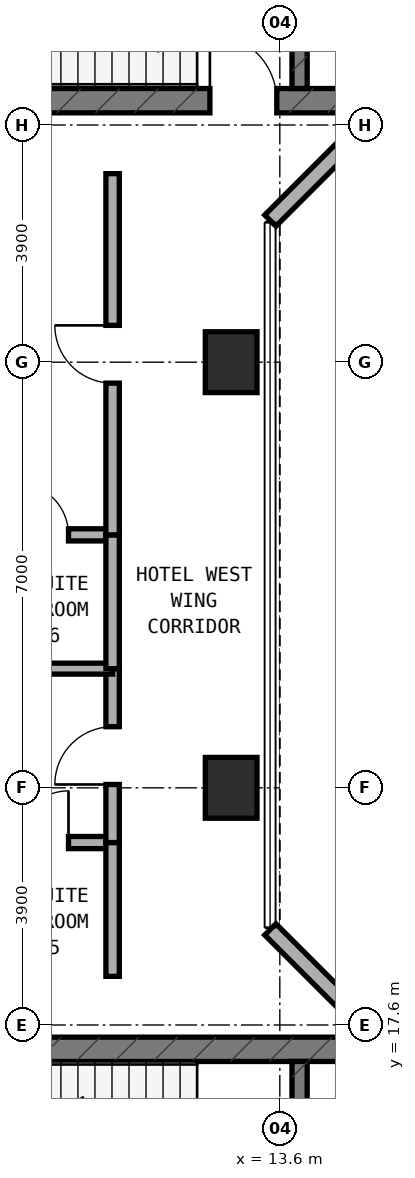
"""IFC4 building model, lengths in metres.
Left out: names, types, materials, properties, quantities, classifications, styles, units other than length and angle.
Written with IfcOpenShell. Run it as: python <this file> out.ifc"""

import sys

from ifc_helpers import new_model, si_unit, direction, frame, frame_2d, origin, origin_2d, place, context, subcontext, project, spatial, rectangle, extrude, element, fill, save


model = new_model("IFC4")
c1 = context("Model", 3, precision=1e-05, world=origin(), true_north=direction((0.0, 1.0)))
c2 = subcontext(c1, "Body", "Model", "MODEL_VIEW")
j1 = project(units=[si_unit("LENGTHUNIT", "METRE"), si_unit("PLANEANGLEUNIT", "RADIAN")], contexts=[c1])
p1 = place(None, origin())
s1 = spatial("IfcSite", under=j1, at=p1, CompositionType="ELEMENT")
p2 = place(p1, origin())
s2 = spatial("IfcBuilding", under=s1, at=p2, CompositionType="ELEMENT")
p3 = place(p2, frame((0.0, 0.0, 109.0)))
s3 = spatial("IfcBuildingStorey", under=s2, at=p3, CompositionType="ELEMENT", Elevation=109.0)
p4 = place(p3, frame((6.4, 32.8, 0.0), z_axis=(0.0, 0.0, 1.0), x_axis=(1.0, 0.0, 0.0)))
e1 = element("IfcWall", 1, at=p4, inside=s3, PredefinedType="SHEAR", context=c2, shape_type="SweptSolid", body=[
    extrude(rectangle(XDim=24.4, YDim=0.4, at=frame_2d((12.2, 0.0))), origin(), (0.0, 0.0, 1.0), 3.5),
])
p5 = place(p4, frame((6.05, 0.0, 0.0)))
e2 = element("IfcOpeningElement", 2, at=p5, cuts=e1, PredefinedType="OPENING", context=c2, shape_type="SweptSolid", body=[
    extrude(rectangle(XDim=1.1, YDim=2.15, at=frame_2d((0.55, 1.075))), frame((0.0, 0.21, 0.0), z_axis=(0.0, -1.0, 0.0), x_axis=(1.0, 0.0, 0.0)), (0.0, 0.0, 1.0), 0.42),
])
p6 = place(p3, frame((13.925, 33.0, 0.0), z_axis=(0.0, 0.0, 1.0), x_axis=(0.0, 1.0, 0.0)))
e3 = element("IfcWall", 3, at=p6, inside=s3, PredefinedType="STANDARD", context=c2, shape_type="SweptSolid", body=[
    extrude(rectangle(XDim=3.16, YDim=0.25, at=frame_2d((1.58, 0.0))), origin(), (0.0, 0.0, 1.0), 3.22),
])
p7 = place(p6, frame((0.98, 0.0, 0.0)))
e4 = element("IfcOpeningElement", 4, at=p7, cuts=e3, PredefinedType="OPENING", context=c2, shape_type="SweptSolid", body=[
    extrude(rectangle(XDim=1.1, YDim=2.15, at=frame_2d((0.55, 1.075))), frame((0.0, 0.135, 0.0), z_axis=(0.0, -1.0, 0.0), x_axis=(1.0, 0.0, 0.0)), (0.0, 0.0, 1.0), 0.27),
])
p8 = place(p3, frame((6.4, 17.2, 0.0), z_axis=(0.0, 0.0, 1.0), x_axis=(1.0, 0.0, 0.0)))
e5 = element("IfcWall", 5, at=p8, inside=s3, PredefinedType="SHEAR", context=c2, shape_type="SweptSolid", body=[
    extrude(rectangle(XDim=24.4, YDim=0.4, at=frame_2d((12.2, 0.0))), origin(), (0.0, 0.0, 1.0), 3.5),
])
p9 = place(p3, frame((13.925, 13.84, 0.0), z_axis=(0.0, 0.0, 1.0), x_axis=(0.0, 1.0, 0.0)))
e6 = element("IfcWall", 6, at=p9, inside=s3, PredefinedType="STANDARD", context=c2, shape_type="SweptSolid", body=[
    extrude(rectangle(XDim=3.16, YDim=0.25, at=frame_2d((1.58, 0.0))), origin(), (0.0, 0.0, 1.0), 3.22),
])
p10 = place(p9, frame((0.98, 0.0, 0.0)))
e7 = element("IfcOpeningElement", 7, at=p10, cuts=e6, PredefinedType="OPENING", context=c2, shape_type="SweptSolid", body=[
    extrude(rectangle(XDim=1.1, YDim=2.15, at=frame_2d((0.55, 1.075))), frame((0.0, 0.135, 0.0), z_axis=(0.0, -1.0, 0.0), x_axis=(1.0, 0.0, 0.0)), (0.0, 0.0, 1.0), 0.27),
])
for number, where, z_axis, x_axis in (
    (8, (12.8, 21.5, 0.0), (0.0, 0.0, 1.0), (1.0, 0.0, 0.0)),
    (9, (12.8, 28.5, 0.0), (0.0, 0.0, 1.0), (1.0, 0.0, 0.0)),
):
    element("IfcColumn", number, at=place(p3, frame(where, z_axis=z_axis, x_axis=x_axis)), inside=s3, PredefinedType="COLUMN", context=c2, shape_type="SweptSolid", body=[
        extrude(rectangle(XDim=0.85, YDim=1.0, at=origin_2d()), origin(), (0.0, 0.0, 1.0), 3.5),
    ])
for number, where, z_axis, x_axis in (
    (10, (15.278, 32.662, 0.0), (0.0, 0.0, 1.0), (-0.707, -0.707, 0.0)),
    (11, (13.444, 19.172, 0.0), (0.0, 0.0, 1.0), (0.707, -0.707, 0.0)),
):
    element("IfcWall", number, at=place(p3, frame(where, z_axis=z_axis, x_axis=x_axis)), inside=s3, PredefinedType="STANDARD", context=c2, shape_type="SweptSolid", body=[
        extrude(rectangle(XDim=2.594, YDim=0.26, at=frame_2d((1.297, 0.0))), origin(), (0.0, 0.0, 1.0), 3.22),
    ])
p11 = place(p3, frame((8.65, 20.6, 0.0), z_axis=(0.0, 0.0, 1.0), x_axis=(1.0, 0.0, 0.0)))
e12 = element("IfcWall", 12, at=p11, inside=s3, PredefinedType="PLUMBINGWALL", context=c2, shape_type="SweptSolid", body=[
    extrude(rectangle(XDim=2.1, YDim=0.2, at=frame_2d((1.05, 0.0))), origin(), (0.0, 0.0, 1.0), 3.22),
])
p12 = place(p11, frame((0.625, 0.0, 0.0)))
e13 = element("IfcOpeningElement", 13, at=p12, cuts=e12, PredefinedType="OPENING", context=c2, shape_type="SweptSolid", body=[
    extrude(rectangle(XDim=0.85, YDim=2.1, at=frame_2d((0.425, 1.05))), frame((0.0, 0.11, 0.0), z_axis=(0.0, -1.0, 0.0), x_axis=(1.0, 0.0, 0.0)), (0.0, 0.0, 1.0), 0.22),
])
p13 = place(p3, frame((10.85, 18.4, 0.0), z_axis=(0.0, 0.0, 1.0), x_axis=(0.0, 1.0, 0.0)))
e14 = element("IfcWall", 14, at=p13, inside=s3, PredefinedType="SOLIDWALL", context=c2, shape_type="SweptSolid", body=[
    extrude(rectangle(XDim=2.2, YDim=0.22, at=frame_2d((1.1, 0.0))), origin(), (0.0, 0.0, 1.0), 3.22),
])
p14 = place(p3, frame((10.85, 20.6, 0.0), z_axis=(0.0, 0.0, 1.0), x_axis=(0.0, 1.0, 0.0)))
e15 = element("IfcWall", 15, at=p14, inside=s3, PredefinedType="SOLIDWALL", context=c2, shape_type="SweptSolid", body=[
    extrude(rectangle(XDim=2.86, YDim=0.22, at=frame_2d((1.43, 0.0))), origin(), (0.0, 0.0, 1.0), 2.595),
])
p15 = place(p14, frame((0.955, 0.0, 0.0)))
e16 = element("IfcOpeningElement", 16, at=p15, cuts=e15, PredefinedType="OPENING", context=c2, shape_type="SweptSolid", body=[
    extrude(rectangle(XDim=0.95, YDim=2.1, at=frame_2d((0.475, 1.05))), frame((0.0, 0.12, 0.0), z_axis=(0.0, -1.0, 0.0), x_axis=(1.0, 0.0, 0.0)), (0.0, 0.0, 1.0), 0.24),
])
p16 = place(p3, frame((0.86, 23.46, 0.0), z_axis=(0.0, 0.0, 1.0), x_axis=(1.0, 0.0, 0.0)))
e17 = element("IfcWall", 17, at=p16, inside=s3, PredefinedType="SOLIDWALL", context=c2, shape_type="SweptSolid", body=[
    extrude(rectangle(XDim=9.99, YDim=0.18, at=frame_2d((4.995, 0.0))), origin(), (0.0, 0.0, 1.0), 2.835),
])
p17 = place(p3, frame((8.65, 25.66, 0.0), z_axis=(0.0, 0.0, 1.0), x_axis=(1.0, 0.0, 0.0)))
e18 = element("IfcWall", 18, at=p17, inside=s3, PredefinedType="PLUMBINGWALL", context=c2, shape_type="SweptSolid", body=[
    extrude(rectangle(XDim=2.1, YDim=0.2, at=frame_2d((1.05, 0.0))), origin(), (0.0, 0.0, 1.0), 3.22),
])
p18 = place(p17, frame((0.625, 0.0, 0.0)))
e19 = element("IfcOpeningElement", 19, at=p18, cuts=e18, PredefinedType="OPENING", context=c2, shape_type="SweptSolid", body=[
    extrude(rectangle(XDim=0.85, YDim=2.1, at=frame_2d((0.425, 1.05))), frame((0.0, 0.11, 0.0), z_axis=(0.0, -1.0, 0.0), x_axis=(1.0, 0.0, 0.0)), (0.0, 0.0, 1.0), 0.22),
])
p19 = place(p3, frame((10.85, 23.46, 0.0), z_axis=(0.0, 0.0, 1.0), x_axis=(0.0, 1.0, 0.0)))
e20 = element("IfcWall", 20, at=p19, inside=s3, PredefinedType="SOLIDWALL", context=c2, shape_type="SweptSolid", body=[
    extrude(rectangle(XDim=2.2, YDim=0.22, at=frame_2d((1.1, 0.0))), origin(), (0.0, 0.0, 1.0), 3.22),
])
p20 = place(p3, frame((10.85, 25.66, 0.0), z_axis=(0.0, 0.0, 1.0), x_axis=(0.0, 1.0, 0.0)))
e21 = element("IfcWall", 21, at=p20, inside=s3, PredefinedType="SOLIDWALL", context=c2, shape_type="SweptSolid", body=[
    extrude(rectangle(XDim=5.94, YDim=0.22, at=frame_2d((2.97, 0.0))), origin(), (0.0, 0.0, 1.0), 2.595),
])
p21 = place(p20, frame((2.495, 0.0, 0.0)))
e22 = element("IfcOpeningElement", 22, at=p21, cuts=e21, PredefinedType="OPENING", context=c2, shape_type="SweptSolid", body=[
    extrude(rectangle(XDim=0.95, YDim=2.1, at=frame_2d((0.475, 1.05))), frame((0.0, 0.12, 0.0), z_axis=(0.0, -1.0, 0.0), x_axis=(1.0, 0.0, 0.0)), (0.0, 0.0, 1.0), 0.24),
])
p22 = place(p5, origin())
e23 = element("IfcDoor", 23, at=p22, inside=s3, OperationType="SINGLE_SWING_LEFT", PredefinedType="DOOR", context=c2, shape_type="SweptSolid", body=[
    extrude(rectangle(XDim=1.1, YDim=2.15, at=frame_2d((0.55, 1.075))), frame((0.0, 0.025, 0.0), z_axis=(0.0, -1.0, 0.0), x_axis=(1.0, 0.0, 0.0)), (0.0, 0.0, 1.0), 0.05),
])
fill(e2, e23)
p23 = place(p12, origin())
e24 = element("IfcDoor", 24, at=p23, inside=s3, OperationType="SINGLE_SWING_RIGHT", PredefinedType="DOOR", context=c2, shape_type="SweptSolid", body=[
    extrude(rectangle(XDim=0.85, YDim=2.1, at=frame_2d((0.425, 1.05))), frame((0.0, 0.025, 0.0), z_axis=(0.0, -1.0, 0.0), x_axis=(1.0, 0.0, 0.0)), (0.0, 0.0, 1.0), 0.05),
])
fill(e13, e24)
p24 = place(p15, origin())
e25 = element("IfcDoor", 25, at=p24, inside=s3, OperationType="SINGLE_SWING_LEFT", PredefinedType="DOOR", context=c2, shape_type="SweptSolid", body=[
    extrude(rectangle(XDim=0.95, YDim=2.1, at=frame_2d((0.475, 1.05))), frame((0.0, 0.025, 0.0), z_axis=(0.0, -1.0, 0.0), x_axis=(1.0, 0.0, 0.0)), (0.0, 0.0, 1.0), 0.05),
])
fill(e16, e25)
p25 = place(p18, origin())
e26 = element("IfcDoor", 26, at=p25, inside=s3, OperationType="SINGLE_SWING_LEFT", PredefinedType="DOOR", context=c2, shape_type="SweptSolid", body=[
    extrude(rectangle(XDim=0.85, YDim=2.1, at=frame_2d((0.425, 1.05))), frame((0.0, 0.025, 0.0), z_axis=(0.0, -1.0, 0.0), x_axis=(1.0, 0.0, 0.0)), (0.0, 0.0, 1.0), 0.05),
])
fill(e19, e26)
p26 = place(p21, origin())
e27 = element("IfcDoor", 27, at=p26, inside=s3, OperationType="SINGLE_SWING_RIGHT", PredefinedType="DOOR", context=c2, shape_type="SweptSolid", body=[
    extrude(rectangle(XDim=0.95, YDim=2.1, at=frame_2d((0.475, 1.05))), frame((0.0, 0.025, 0.0), z_axis=(0.0, -1.0, 0.0), x_axis=(1.0, 0.0, 0.0)), (0.0, 0.0, 1.0), 0.05),
])
fill(e22, e27)
save(model, sys.argv[1])
